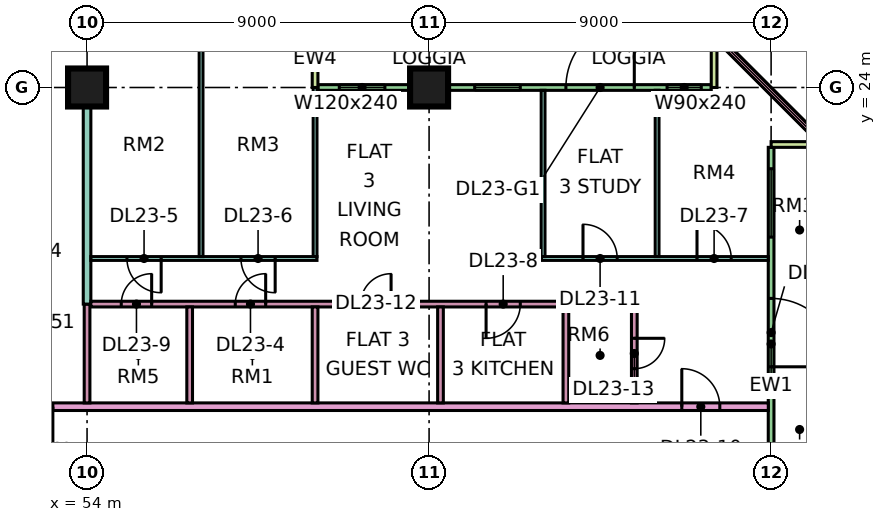
"""IFC4 building model, lengths in metres.
Left out: names, types, materials, properties, quantities, classifications, styles, units other than length and angle.
Written with IfcOpenShell. Run it as: python <this file> out.ifc"""

import sys

from ifc_helpers import new_model, si_unit, direction, frame, frame_2d, origin, origin_2d, place, context, subcontext, project, spatial, rectangle, extrude, element, fill, save


model = new_model("IFC4")
c1 = context("Model", 3, precision=1e-05, world=origin(), true_north=direction((0.0, 1.0)))
c2 = subcontext(c1, "Body", "Model", "MODEL_VIEW")
j1 = project(units=[si_unit("LENGTHUNIT", "METRE"), si_unit("PLANEANGLEUNIT", "RADIAN")], contexts=[c1])
p1 = place(None, origin())
s1 = spatial("IfcSite", under=j1, at=p1, CompositionType="ELEMENT")
p2 = place(p1, origin())
s2 = spatial("IfcBuilding", under=s1, at=p2, CompositionType="ELEMENT")
p3 = place(p2, frame((0.0, 0.0, 103.15)))
s3 = spatial("IfcBuildingStorey", under=s2, at=p3, CompositionType="ELEMENT", Elevation=103.15)
for number, where, z_axis, x_axis in (
    (1, (54.0, 24.0, 0.0), (0.0, 0.0, 1.0), (1.0, 0.0, 0.0)),
    (2, (63.0, 24.0, 0.0), (0.0, 0.0, 1.0), (1.0, 0.0, 0.0)),
):
    element("IfcColumn", number, at=place(p3, frame(where, z_axis=z_axis, x_axis=x_axis)), inside=s3, PredefinedType="COLUMN", context=c2, shape_type="SweptSolid", body=[
        extrude(rectangle(XDim=1.0, YDim=1.0, at=origin_2d()), origin(), (0.0, 0.0, 1.0), 3.75),
    ])
p4 = place(p3, frame((70.425, 24.0, 0.0), z_axis=(0.0, 0.0, 1.0), x_axis=(-1.0, 0.0, 0.0)))
e3 = element("IfcWall", 3, at=p4, inside=s3, PredefinedType="SOLIDWALL", context=c2, shape_type="SweptSolid", body=[
    extrude(rectangle(XDim=10.35, YDim=0.15, at=frame_2d((5.175, 0.0))), origin(), (0.0, 0.0, 1.0), 3.35),
])
p5 = place(p4, frame((0.262, 0.0, 0.45)))
e4 = element("IfcOpeningElement", 4, at=p5, cuts=e3, PredefinedType="OPENING", context=c2, shape_type="SweptSolid", body=[
    extrude(rectangle(XDim=0.9, YDim=2.4, at=frame_2d((0.45, 1.2))), frame((0.0, 0.085, 0.0), z_axis=(0.0, -1.0, 0.0), x_axis=(1.0, 0.0, 0.0)), (0.0, 0.0, 1.0), 0.17),
])
p6 = place(p4, frame((2.025, 0.0, 0.0)))
e5 = element("IfcOpeningElement", 5, at=p6, cuts=e3, PredefinedType="OPENING", context=c2, shape_type="SweptSolid", body=[
    extrude(rectangle(XDim=1.8, YDim=2.4, at=frame_2d((0.9, 1.2))), frame((0.0, 0.085, 0.0), z_axis=(0.0, -1.0, 0.0), x_axis=(1.0, 0.0, 0.0)), (0.0, 0.0, 1.0), 0.17),
])
p7 = place(p4, frame((5.025, 0.0, 0.45)))
e6 = element("IfcOpeningElement", 6, at=p7, cuts=e3, PredefinedType="OPENING", context=c2, shape_type="SweptSolid", body=[
    extrude(rectangle(XDim=1.2, YDim=2.4, at=frame_2d((0.6, 1.2))), frame((0.0, 0.085, 0.0), z_axis=(0.0, -1.0, 0.0), x_axis=(1.0, 0.0, 0.0)), (0.0, 0.0, 1.0), 0.17),
])
p8 = place(p4, frame((8.587, 0.0, 0.45)))
e7 = element("IfcOpeningElement", 7, at=p8, cuts=e3, PredefinedType="OPENING", context=c2, shape_type="SweptSolid", body=[
    extrude(rectangle(XDim=1.2, YDim=2.4, at=frame_2d((0.6, 1.2))), frame((0.0, 0.085, 0.0), z_axis=(0.0, -1.0, 0.0), x_axis=(1.0, 0.0, 0.0)), (0.0, 0.0, 1.0), 0.17),
])
for number, where, z_axis, x_axis in (
    (8, (70.5, 25.5, 0.0), (0.0, 0.0, 1.0), (0.0, -1.0, 0.0)),
    (9, (60.0, 25.5, 0.0), (0.0, 0.0, 1.0), (0.0, -1.0, 0.0)),
):
    element("IfcWall", number, at=place(p3, frame(where, z_axis=z_axis, x_axis=x_axis)), inside=s3, PredefinedType="SOLIDWALL", context=c2, shape_type="SweptSolid", body=[
        extrude(rectangle(XDim=1.5, YDim=0.15, at=frame_2d((0.75, 0.0))), origin(), (0.0, 0.0, 1.0), 3.35),
    ])
p9 = place(p3, frame((72.0, 12.075, 0.0), z_axis=(0.0, 0.0, 1.0), x_axis=(0.0, 1.0, 0.0)))
e10 = element("IfcWall", 10, at=p9, inside=s3, PredefinedType="SOLIDWALL", context=c2, shape_type="SweptSolid", body=[
    extrude(rectangle(XDim=10.35, YDim=0.15, at=frame_2d((5.175, 0.0))), origin(), (0.0, 0.0, 1.0), 3.35),
])
p10 = place(p9, frame((4.575, 0.0, 0.0)))
e11 = element("IfcOpeningElement", 11, at=p10, cuts=e10, PredefinedType="OPENING", context=c2, shape_type="SweptSolid", body=[
    extrude(rectangle(XDim=1.8, YDim=2.4, at=frame_2d((0.9, 1.2))), frame((0.0, 0.085, 0.0), z_axis=(0.0, -1.0, 0.0), x_axis=(1.0, 0.0, 0.0)), (0.0, 0.0, 1.0), 0.17),
])
p11 = place(p9, frame((7.988, 0.0, 0.45)))
e12 = element("IfcOpeningElement", 12, at=p11, cuts=e10, PredefinedType="OPENING", context=c2, shape_type="SweptSolid", body=[
    extrude(rectangle(XDim=1.8, YDim=2.4, at=frame_2d((0.9, 1.2))), frame((0.0, 0.085, 0.0), z_axis=(0.0, -1.0, 0.0), x_axis=(1.0, 0.0, 0.0)), (0.0, 0.0, 1.0), 0.17),
])
p12 = place(p3, frame((73.5, 22.5, 0.0), z_axis=(0.0, 0.0, 1.0), x_axis=(-1.0, 0.0, 0.0)))
e13 = element("IfcWall", 13, at=p12, inside=s3, PredefinedType="SOLIDWALL", context=c2, shape_type="SweptSolid", body=[
    extrude(rectangle(XDim=1.5, YDim=0.15, at=frame_2d((0.75, 0.0))), origin(), (0.0, 0.0, 1.0), 3.35),
])
p13 = place(p3, frame((73.447, 22.447, 0.0), z_axis=(0.0, 0.0, 1.0), x_axis=(-0.707106781187, 0.707106781187, 0.0)))
e14 = element("IfcWall", 14, at=p13, inside=s3, PredefinedType="SOLIDWALL", context=c2, shape_type="SweptSolid", body=[
    extrude(rectangle(XDim=4.243, YDim=0.15, at=frame_2d((2.121, 0.0))), origin(), (0.0, 0.0, 1.0), 3.35),
])
p14 = place(p13, frame((0.621, 0.0, 0.45)))
e15 = element("IfcOpeningElement", 15, at=p14, cuts=e14, PredefinedType="OPENING", context=c2, shape_type="SweptSolid", body=[
    extrude(rectangle(XDim=3.0, YDim=2.4, at=frame_2d((1.5, 1.2))), frame((0.0, 0.085, 0.0), z_axis=(0.0, -1.0, 0.0), x_axis=(1.0, 0.0, 0.0)), (0.0, 0.0, 1.0), 0.17),
])
p15 = place(p3, frame((51.225, 15.6, 0.0), z_axis=(0.0, 0.0, 1.0), x_axis=(1.0, 0.0, 0.0)))
e16 = element("IfcWall", 16, at=p15, inside=s3, PredefinedType="PARTITIONING", context=c2, shape_type="SweptSolid", body=[
    extrude(rectangle(XDim=20.701, YDim=0.2, at=frame_2d((10.351, 0.0))), origin(), (0.0, 0.0, 1.0), 3.35),
])
p16 = place(p15, frame((18.425, 0.0, 0.0)))
e17 = element("IfcOpeningElement", 17, at=p16, cuts=e16, PredefinedType="OPENING", context=c2, shape_type="SweptSolid", body=[
    extrude(rectangle(XDim=1.0, YDim=2.1, at=frame_2d((0.5, 1.05))), frame((0.0, 0.11, 0.0), z_axis=(0.0, -1.0, 0.0), x_axis=(1.0, 0.0, 0.0)), (0.0, 0.0, 1.0), 0.22),
])
p17 = place(p15, frame((0.875, 0.0, 0.0)))
e18 = element("IfcOpeningElement", 18, at=p17, cuts=e16, PredefinedType="OPENING", context=c2, shape_type="SweptSolid", body=[
    extrude(rectangle(XDim=1.0, YDim=2.1, at=frame_2d((0.5, 1.05))), frame((0.0, 0.11, 0.0), z_axis=(0.0, -1.0, 0.0), x_axis=(1.0, 0.0, 0.0)), (0.0, 0.0, 1.0), 0.22),
])
p18 = place(p3, frame((54.0, 15.7, 0.0), z_axis=(0.0, 0.0, 1.0), x_axis=(0.0, 1.0, 0.0)))
e19 = element("IfcWall", 19, at=p18, inside=s3, PredefinedType="PARTITIONING", context=c2, shape_type="SweptSolid", body=[
    extrude(rectangle(XDim=2.6, YDim=0.15, at=frame_2d((1.3, 0.0))), origin(), (0.0, 0.0, 1.0), 3.35),
])
p19 = place(p3, frame((54.0, 18.3, 0.0), z_axis=(0.0, 0.0, 1.0), x_axis=(0.0, 1.0, 0.0)))
e20 = element("IfcWall", 20, at=p19, inside=s3, PredefinedType="PARTITIONING", context=c2, shape_type="SweptSolid", body=[
    extrude(rectangle(XDim=5.7, YDim=0.2, at=frame_2d((2.85, 0.0))), origin(), (0.0, 0.0, 1.0), 3.35),
])
p20 = place(p3, frame((54.1, 18.3, 0.0), z_axis=(0.0, 0.0, 1.0), x_axis=(1.0, 0.0, 0.0)))
e21 = element("IfcWall", 21, at=p20, inside=s3, PredefinedType="PARTITIONING", context=c2, shape_type="SweptSolid", body=[
    extrude(rectangle(XDim=14.375, YDim=0.15, at=frame_2d((7.188, 0.0))), origin(), (0.0, 0.0, 1.0), 3.35),
])
p21 = place(p20, frame((3.8, 0.0, 0.0)))
e22 = element("IfcOpeningElement", 22, at=p21, cuts=e21, PredefinedType="OPENING", context=c2, shape_type="SweptSolid", body=[
    extrude(rectangle(XDim=0.8, YDim=2.1, at=frame_2d((0.4, 1.05))), frame((0.0, 0.085, 0.0), z_axis=(0.0, -1.0, 0.0), x_axis=(1.0, 0.0, 0.0)), (0.0, 0.0, 1.0), 0.17),
])
p22 = place(p20, frame((10.4, 0.0, 0.0)))
e23 = element("IfcOpeningElement", 23, at=p22, cuts=e21, PredefinedType="OPENING", context=c2, shape_type="SweptSolid", body=[
    extrude(rectangle(XDim=0.9, YDim=2.1, at=frame_2d((0.45, 1.05))), frame((0.0, 0.085, 0.0), z_axis=(0.0, -1.0, 0.0), x_axis=(1.0, 0.0, 0.0)), (0.0, 0.0, 1.0), 0.17),
])
p23 = place(p20, frame((0.8, 0.0, 0.0)))
e24 = element("IfcOpeningElement", 24, at=p23, cuts=e21, PredefinedType="OPENING", context=c2, shape_type="SweptSolid", body=[
    extrude(rectangle(XDim=0.8, YDim=2.1, at=frame_2d((0.4, 1.05))), frame((0.0, 0.085, 0.0), z_axis=(0.0, -1.0, 0.0), x_axis=(1.0, 0.0, 0.0)), (0.0, 0.0, 1.0), 0.17),
])
p24 = place(p20, frame((7.1, 0.0, 0.0)))
e25 = element("IfcOpeningElement", 25, at=p24, cuts=e21, PredefinedType="OPENING", context=c2, shape_type="SweptSolid", body=[
    extrude(rectangle(XDim=0.8, YDim=2.1, at=frame_2d((0.4, 1.05))), frame((0.0, 0.085, 0.0), z_axis=(0.0, -1.0, 0.0), x_axis=(1.0, 0.0, 0.0)), (0.0, 0.0, 1.0), 0.17),
])
p25 = place(p3, frame((54.1, 19.5, 0.0), z_axis=(0.0, 0.0, 1.0), x_axis=(1.0, 0.0, 0.0)))
e26 = element("IfcWall", 26, at=p25, inside=s3, PredefinedType="PARTITIONING", context=c2, shape_type="SweptSolid", body=[
    extrude(rectangle(XDim=5.95, YDim=0.1, at=frame_2d((2.975, 0.0))), origin(), (0.0, 0.0, 1.0), 3.35),
])
p26 = place(p25, frame((0.95, 0.0, 0.0)))
e27 = element("IfcOpeningElement", 27, at=p26, cuts=e26, PredefinedType="OPENING", context=c2, shape_type="SweptSolid", body=[
    extrude(rectangle(XDim=0.9, YDim=2.1, at=frame_2d((0.45, 1.05))), frame((0.0, 0.06, 0.0), z_axis=(0.0, -1.0, 0.0), x_axis=(1.0, 0.0, 0.0)), (0.0, 0.0, 1.0), 0.12),
])
p27 = place(p25, frame((3.95, 0.0, 0.0)))
e28 = element("IfcOpeningElement", 28, at=p27, cuts=e26, PredefinedType="OPENING", context=c2, shape_type="SweptSolid", body=[
    extrude(rectangle(XDim=0.9, YDim=2.1, at=frame_2d((0.45, 1.05))), frame((0.0, 0.06, 0.0), z_axis=(0.0, -1.0, 0.0), x_axis=(1.0, 0.0, 0.0)), (0.0, 0.0, 1.0), 0.12),
])
p28 = place(p3, frame((56.7, 15.7, 0.0), z_axis=(0.0, 0.0, 1.0), x_axis=(0.0, 1.0, 0.0)))
e29 = element("IfcWall", 29, at=p28, inside=s3, PredefinedType="PARTITIONING", context=c2, shape_type="SweptSolid", body=[
    extrude(rectangle(XDim=2.525, YDim=0.15, at=frame_2d((1.263, 0.0))), origin(), (0.0, 0.0, 1.0), 3.35),
])
p29 = place(p3, frame((57.0, 19.55, 0.0), z_axis=(0.0, 0.0, 1.0), x_axis=(0.0, 1.0, 0.0)))
e30 = element("IfcWall", 30, at=p29, inside=s3, PredefinedType="PARTITIONING", context=c2, shape_type="SweptSolid", body=[
    extrude(rectangle(XDim=5.801, YDim=0.1, at=frame_2d((2.9, 0.0))), origin(), (0.0, 0.0, 1.0), 3.35),
])
p30 = place(p3, frame((60.0, 15.7, 0.0), z_axis=(0.0, 0.0, 1.0), x_axis=(0.0, 1.0, 0.0)))
e31 = element("IfcWall", 31, at=p30, inside=s3, PredefinedType="PARTITIONING", context=c2, shape_type="SweptSolid", body=[
    extrude(rectangle(XDim=2.525, YDim=0.15, at=frame_2d((1.263, 0.0))), origin(), (0.0, 0.0, 1.0), 3.35),
])
p31 = place(p3, frame((60.0, 19.55, 0.0), z_axis=(0.0, 0.0, 1.0), x_axis=(0.0, 1.0, 0.0)))
e32 = element("IfcWall", 32, at=p31, inside=s3, PredefinedType="PARTITIONING", context=c2, shape_type="SweptSolid", body=[
    extrude(rectangle(XDim=4.45, YDim=0.1, at=frame_2d((2.225, 0.0))), origin(), (0.0, 0.0, 1.0), 3.35),
])
p32 = place(p3, frame((63.3, 15.7, 0.0), z_axis=(0.0, 0.0, 1.0), x_axis=(0.0, 1.0, 0.0)))
e33 = element("IfcWall", 33, at=p32, inside=s3, PredefinedType="PARTITIONING", context=c2, shape_type="SweptSolid", body=[
    extrude(rectangle(XDim=2.525, YDim=0.15, at=frame_2d((1.263, 0.0))), origin(), (0.0, 0.0, 1.0), 3.35),
])
p33 = place(p3, frame((65.95, 19.5, 0.0), z_axis=(0.0, 0.0, 1.0), x_axis=(1.0, 0.0, 0.0)))
e34 = element("IfcWall", 34, at=p33, inside=s3, PredefinedType="PARTITIONING", context=c2, shape_type="SweptSolid", body=[
    extrude(rectangle(XDim=5.976, YDim=0.1, at=frame_2d((2.988, 0.0))), origin(), (0.0, 0.0, 1.0), 3.35),
])
p34 = place(p33, frame((4.1, 0.0, 0.0)))
e35 = element("IfcOpeningElement", 35, at=p34, cuts=e34, PredefinedType="OPENING", context=c2, shape_type="SweptSolid", body=[
    extrude(rectangle(XDim=0.9, YDim=2.1, at=frame_2d((0.45, 1.05))), frame((0.0, 0.06, 0.0), z_axis=(0.0, -1.0, 0.0), x_axis=(1.0, 0.0, 0.0)), (0.0, 0.0, 1.0), 0.12),
])
p35 = place(p33, frame((1.1, 0.0, 0.0)))
e36 = element("IfcOpeningElement", 36, at=p35, cuts=e34, PredefinedType="OPENING", context=c2, shape_type="SweptSolid", body=[
    extrude(rectangle(XDim=0.9, YDim=2.1, at=frame_2d((0.45, 1.05))), frame((0.0, 0.06, 0.0), z_axis=(0.0, -1.0, 0.0), x_axis=(1.0, 0.0, 0.0)), (0.0, 0.0, 1.0), 0.12),
])
p36 = place(p3, frame((66.0, 19.55, 0.0), z_axis=(0.0, 0.0, 1.0), x_axis=(0.0, 1.0, 0.0)))
e37 = element("IfcWall", 37, at=p36, inside=s3, PredefinedType="PARTITIONING", context=c2, shape_type="SweptSolid", body=[
    extrude(rectangle(XDim=4.376, YDim=0.1, at=frame_2d((2.188, 0.0))), origin(), (0.0, 0.0, 1.0), 3.35),
])
p37 = place(p3, frame((66.6, 15.7, 0.0), z_axis=(0.0, 0.0, 1.0), x_axis=(0.0, 1.0, 0.0)))
e38 = element("IfcWall", 38, at=p37, inside=s3, PredefinedType="PARTITIONING", context=c2, shape_type="SweptSolid", body=[
    extrude(rectangle(XDim=2.525, YDim=0.15, at=frame_2d((1.263, 0.0))), origin(), (0.0, 0.0, 1.0), 3.35),
])
p38 = place(p3, frame((68.4, 15.7, 0.0), z_axis=(0.0, 0.0, 1.0), x_axis=(0.0, 1.0, 0.0)))
e39 = element("IfcWall", 39, at=p38, inside=s3, PredefinedType="PARTITIONING", context=c2, shape_type="SweptSolid", body=[
    extrude(rectangle(XDim=2.525, YDim=0.15, at=frame_2d((1.263, 0.0))), origin(), (0.0, 0.0, 1.0), 3.35),
])
p39 = place(p38, frame((0.9, 0.0, 0.0)))
e40 = element("IfcOpeningElement", 40, at=p39, cuts=e39, PredefinedType="OPENING", context=c2, shape_type="SweptSolid", body=[
    extrude(rectangle(XDim=0.8, YDim=2.1, at=frame_2d((0.4, 1.05))), frame((0.0, 0.085, 0.0), z_axis=(0.0, -1.0, 0.0), x_axis=(1.0, 0.0, 0.0)), (0.0, 0.0, 1.0), 0.17),
])
p40 = place(p3, frame((69.0, 19.55, 0.0), z_axis=(0.0, 0.0, 1.0), x_axis=(0.0, 1.0, 0.0)))
e41 = element("IfcWall", 41, at=p40, inside=s3, PredefinedType="PARTITIONING", context=c2, shape_type="SweptSolid", body=[
    extrude(rectangle(XDim=4.376, YDim=0.1, at=frame_2d((2.188, 0.0))), origin(), (0.0, 0.0, 1.0), 3.35),
])
p41 = place(p5, origin())
e42 = element("IfcWindow", 42, at=p41, inside=s3, PartitioningType="SINGLE_PANEL", PredefinedType="WINDOW", context=c2, shape_type="SweptSolid", body=[
    extrude(rectangle(XDim=0.9, YDim=2.4, at=frame_2d((0.45, 1.2))), frame((0.0, 0.03, 0.0), z_axis=(0.0, -1.0, 0.0), x_axis=(1.0, 0.0, 0.0)), (0.0, 0.0, 1.0), 0.06),
])
fill(e4, e42)
p42 = place(p6, frame((1.8, 0.0, 0.0), z_axis=(0.0, 0.0, 1.0), x_axis=(-1.0, 0.0, 0.0)))
e43 = element("IfcDoor", 43, at=p42, inside=s3, OperationType="DOUBLE_DOOR_SINGLE_SWING", PredefinedType="DOOR", context=c2, shape_type="SweptSolid", body=[
    extrude(rectangle(XDim=1.8, YDim=2.4, at=frame_2d((0.9, 1.2))), frame((0.0, 0.025, 0.0), z_axis=(0.0, -1.0, 0.0), x_axis=(1.0, 0.0, 0.0)), (0.0, 0.0, 1.0), 0.05),
])
fill(e5, e43)
p43 = place(p7, origin())
e44 = element("IfcWindow", 44, at=p43, inside=s3, PartitioningType="SINGLE_PANEL", PredefinedType="WINDOW", context=c2, shape_type="SweptSolid", body=[
    extrude(rectangle(XDim=1.2, YDim=2.4, at=frame_2d((0.6, 1.2))), frame((0.0, 0.03, 0.0), z_axis=(0.0, -1.0, 0.0), x_axis=(1.0, 0.0, 0.0)), (0.0, 0.0, 1.0), 0.06),
])
fill(e6, e44)
p44 = place(p8, origin())
e45 = element("IfcWindow", 45, at=p44, inside=s3, PartitioningType="SINGLE_PANEL", PredefinedType="WINDOW", context=c2, shape_type="SweptSolid", body=[
    extrude(rectangle(XDim=1.2, YDim=2.4, at=frame_2d((0.6, 1.2))), frame((0.0, 0.03, 0.0), z_axis=(0.0, -1.0, 0.0), x_axis=(1.0, 0.0, 0.0)), (0.0, 0.0, 1.0), 0.06),
])
fill(e7, e45)
p45 = place(p10, frame((1.8, 0.0, 0.0), z_axis=(0.0, 0.0, 1.0), x_axis=(-1.0, 0.0, 0.0)))
e46 = element("IfcDoor", 46, at=p45, inside=s3, OperationType="DOUBLE_DOOR_SINGLE_SWING", PredefinedType="DOOR", context=c2, shape_type="SweptSolid", body=[
    extrude(rectangle(XDim=1.8, YDim=2.4, at=frame_2d((0.9, 1.2))), frame((0.0, 0.025, 0.0), z_axis=(0.0, -1.0, 0.0), x_axis=(1.0, 0.0, 0.0)), (0.0, 0.0, 1.0), 0.05),
])
fill(e11, e46)
p46 = place(p11, origin())
e47 = element("IfcWindow", 47, at=p46, inside=s3, PartitioningType="SINGLE_PANEL", PredefinedType="WINDOW", context=c2, shape_type="SweptSolid", body=[
    extrude(rectangle(XDim=1.8, YDim=2.4, at=frame_2d((0.9, 1.2))), frame((0.0, 0.03, 0.0), z_axis=(0.0, -1.0, 0.0), x_axis=(1.0, 0.0, 0.0)), (0.0, 0.0, 1.0), 0.06),
])
fill(e12, e47)
p47 = place(p14, origin())
e48 = element("IfcWindow", 48, at=p47, inside=s3, PartitioningType="SINGLE_PANEL", PredefinedType="WINDOW", context=c2, shape_type="SweptSolid", body=[
    extrude(rectangle(XDim=3.0, YDim=2.4, at=frame_2d((1.5, 1.2))), frame((0.0, 0.03, 0.0), z_axis=(0.0, -1.0, 0.0), x_axis=(1.0, 0.0, 0.0)), (0.0, 0.0, 1.0), 0.06),
])
fill(e15, e48)
p48 = place(p21, frame((0.8, 0.0, 0.0), z_axis=(0.0, 0.0, 1.0), x_axis=(-1.0, 0.0, 0.0)))
e49 = element("IfcDoor", 49, at=p48, inside=s3, OperationType="SINGLE_SWING_RIGHT", PredefinedType="DOOR", context=c2, shape_type="SweptSolid", body=[
    extrude(rectangle(XDim=0.8, YDim=2.1, at=frame_2d((0.4, 1.05))), frame((0.0, 0.025, 0.0), z_axis=(0.0, -1.0, 0.0), x_axis=(1.0, 0.0, 0.0)), (0.0, 0.0, 1.0), 0.05),
])
fill(e22, e49)
p49 = place(p26, origin())
e50 = element("IfcDoor", 50, at=p49, inside=s3, OperationType="SINGLE_SWING_RIGHT", PredefinedType="DOOR", context=c2, shape_type="SweptSolid", body=[
    extrude(rectangle(XDim=0.9, YDim=2.1, at=frame_2d((0.45, 1.05))), frame((0.0, 0.025, 0.0), z_axis=(0.0, -1.0, 0.0), x_axis=(1.0, 0.0, 0.0)), (0.0, 0.0, 1.0), 0.05),
])
fill(e27, e50)
p50 = place(p27, origin())
e51 = element("IfcDoor", 51, at=p50, inside=s3, OperationType="SINGLE_SWING_RIGHT", PredefinedType="DOOR", context=c2, shape_type="SweptSolid", body=[
    extrude(rectangle(XDim=0.9, YDim=2.1, at=frame_2d((0.45, 1.05))), frame((0.0, 0.025, 0.0), z_axis=(0.0, -1.0, 0.0), x_axis=(1.0, 0.0, 0.0)), (0.0, 0.0, 1.0), 0.05),
])
fill(e28, e51)
p51 = place(p34, origin())
e52 = element("IfcDoor", 52, at=p51, inside=s3, OperationType="SINGLE_SWING_LEFT", PredefinedType="DOOR", context=c2, shape_type="SweptSolid", body=[
    extrude(rectangle(XDim=0.9, YDim=2.1, at=frame_2d((0.45, 1.05))), frame((0.0, 0.025, 0.0), z_axis=(0.0, -1.0, 0.0), x_axis=(1.0, 0.0, 0.0)), (0.0, 0.0, 1.0), 0.05),
])
fill(e35, e52)
p52 = place(p22, frame((0.9, 0.0, 0.0), z_axis=(0.0, 0.0, 1.0), x_axis=(-1.0, 0.0, 0.0)))
e53 = element("IfcDoor", 53, at=p52, inside=s3, OperationType="SINGLE_SWING_LEFT", PredefinedType="DOOR", context=c2, shape_type="SweptSolid", body=[
    extrude(rectangle(XDim=0.9, YDim=2.1, at=frame_2d((0.45, 1.05))), frame((0.0, 0.025, 0.0), z_axis=(0.0, -1.0, 0.0), x_axis=(1.0, 0.0, 0.0)), (0.0, 0.0, 1.0), 0.05),
])
fill(e23, e53)
p53 = place(p23, frame((0.8, 0.0, 0.0), z_axis=(0.0, 0.0, 1.0), x_axis=(-1.0, 0.0, 0.0)))
e54 = element("IfcDoor", 54, at=p53, inside=s3, OperationType="SINGLE_SWING_RIGHT", PredefinedType="DOOR", context=c2, shape_type="SweptSolid", body=[
    extrude(rectangle(XDim=0.8, YDim=2.1, at=frame_2d((0.4, 1.05))), frame((0.0, 0.025, 0.0), z_axis=(0.0, -1.0, 0.0), x_axis=(1.0, 0.0, 0.0)), (0.0, 0.0, 1.0), 0.05),
])
fill(e24, e54)
p54 = place(p16, origin())
e55 = element("IfcDoor", 55, at=p54, inside=s3, OperationType="SINGLE_SWING_LEFT", PredefinedType="DOOR", context=c2, shape_type="SweptSolid", body=[
    extrude(rectangle(XDim=1.0, YDim=2.1, at=frame_2d((0.5, 1.05))), frame((0.0, 0.025, 0.0), z_axis=(0.0, -1.0, 0.0), x_axis=(1.0, 0.0, 0.0)), (0.0, 0.0, 1.0), 0.05),
])
fill(e17, e55)
p55 = place(p35, origin())
e56 = element("IfcDoor", 56, at=p55, inside=s3, OperationType="SINGLE_SWING_LEFT", PredefinedType="DOOR", context=c2, shape_type="SweptSolid", body=[
    extrude(rectangle(XDim=0.9, YDim=2.1, at=frame_2d((0.45, 1.05))), frame((0.0, 0.025, 0.0), z_axis=(0.0, -1.0, 0.0), x_axis=(1.0, 0.0, 0.0)), (0.0, 0.0, 1.0), 0.05),
])
fill(e36, e56)
p56 = place(p24, frame((0.8, 0.0, 0.0), z_axis=(0.0, 0.0, 1.0), x_axis=(-1.0, 0.0, 0.0)))
e57 = element("IfcDoor", 57, at=p56, inside=s3, OperationType="SINGLE_SWING_RIGHT", PredefinedType="DOOR", context=c2, shape_type="SweptSolid", body=[
    extrude(rectangle(XDim=0.8, YDim=2.1, at=frame_2d((0.4, 1.05))), frame((0.0, 0.025, 0.0), z_axis=(0.0, -1.0, 0.0), x_axis=(1.0, 0.0, 0.0)), (0.0, 0.0, 1.0), 0.05),
])
fill(e25, e57)
p57 = place(p39, origin())
e58 = element("IfcDoor", 58, at=p57, inside=s3, OperationType="SINGLE_SWING_RIGHT", PredefinedType="DOOR", context=c2, shape_type="SweptSolid", body=[
    extrude(rectangle(XDim=0.8, YDim=2.1, at=frame_2d((0.4, 1.05))), frame((0.0, 0.025, 0.0), z_axis=(0.0, -1.0, 0.0), x_axis=(1.0, 0.0, 0.0)), (0.0, 0.0, 1.0), 0.05),
])
fill(e40, e58)
p58 = place(p17, origin())
e59 = element("IfcDoor", 59, at=p58, inside=s3, OperationType="SINGLE_SWING_RIGHT", PredefinedType="DOOR", context=c2, shape_type="SweptSolid", body=[
    extrude(rectangle(XDim=1.0, YDim=2.1, at=frame_2d((0.5, 1.05))), frame((0.0, 0.025, 0.0), z_axis=(0.0, -1.0, 0.0), x_axis=(1.0, 0.0, 0.0)), (0.0, 0.0, 1.0), 0.05),
])
fill(e18, e59)
save(model, sys.argv[1])
